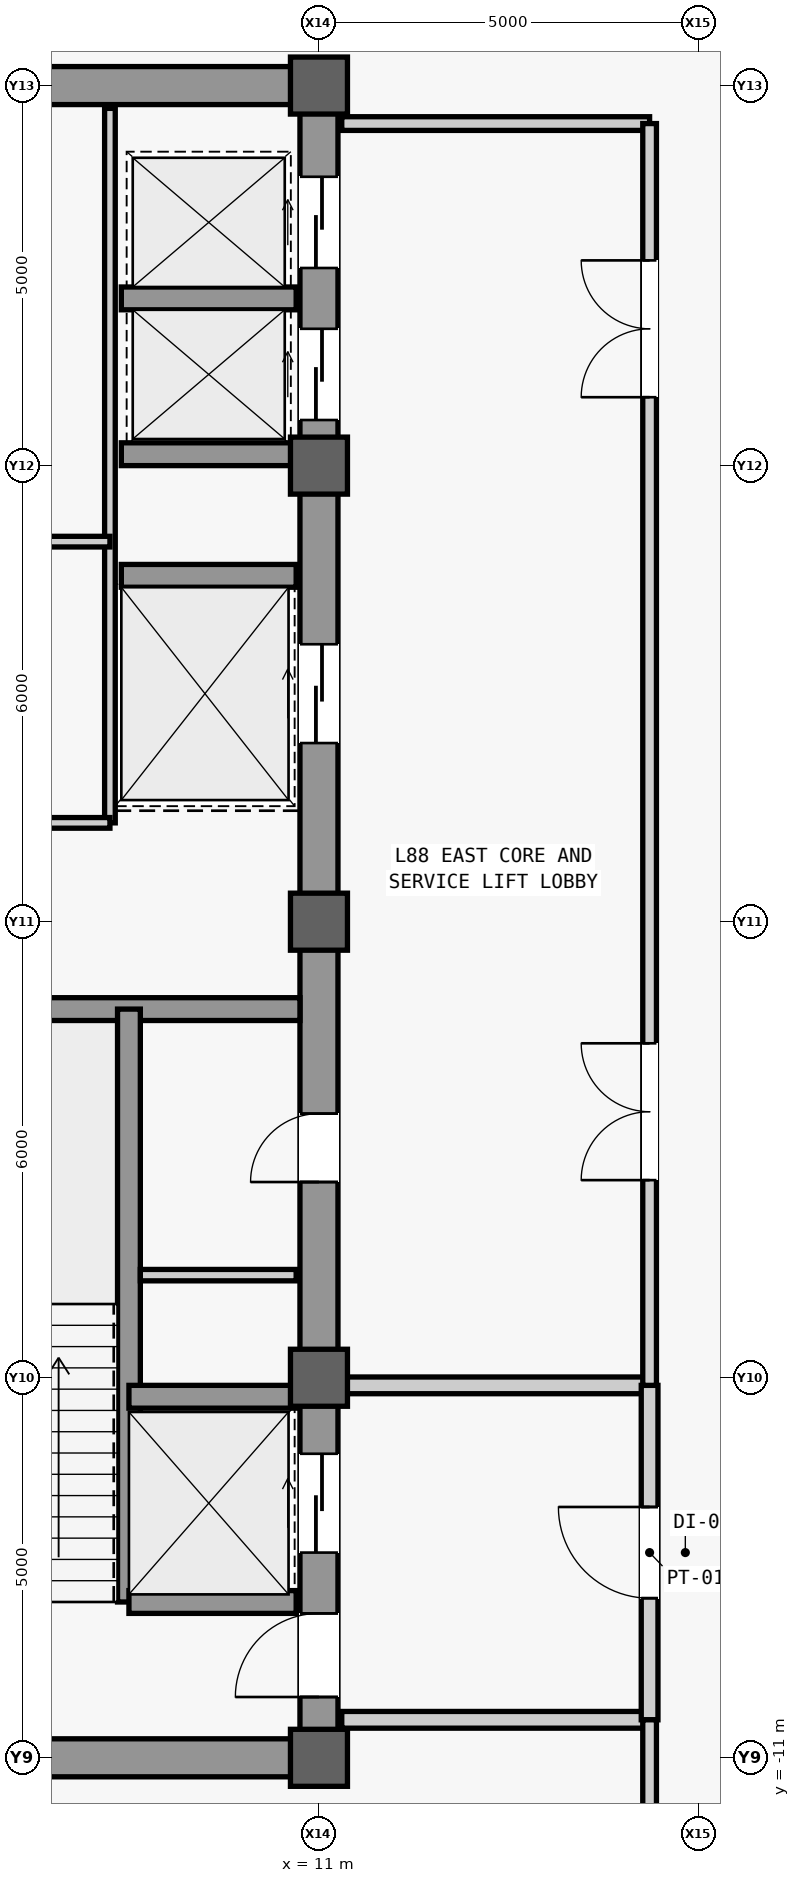
"""IFC4 building model, lengths in metres.
Left out: names, types, materials, properties, quantities, classifications, styles, units other than length and angle.
Written with IfcOpenShell. Run it as: python <this file> out.ifc"""

import sys

from ifc_helpers import new_model, si_unit, direction, frame, frame_2d, origin, origin_2d, place, context, subcontext, project, spatial, rectangle, extrude, source, transform, mapped, element, fill, save


model = new_model("IFC4")
c1 = context("Model", 3, precision=1e-05, world=origin(), true_north=direction((0.0, 1.0)))
c2 = subcontext(c1, "Body", "Model", "MODEL_VIEW")
j1 = project(units=[si_unit("LENGTHUNIT", "METRE"), si_unit("PLANEANGLEUNIT", "RADIAN")], contexts=[c1])
p1 = place(None, origin())
s1 = spatial("IfcSite", under=j1, at=p1, CompositionType="ELEMENT")
p2 = place(p1, origin())
s2 = spatial("IfcBuilding", under=s1, at=p2, CompositionType="ELEMENT")
p3 = place(p2, frame((0.0, 0.0, 370.3)))
s3 = spatial("IfcBuildingStorey", under=s2, at=p3, CompositionType="ELEMENT", Elevation=370.3)
m1 = source(origin(), c2, "Body", "SweptSolid", [
    extrude(rectangle(XDim=22.0, YDim=0.5, at=frame_2d((11.0, 0.0))), origin(), (0.0, 0.0, 1.0), 4.6),
])
p4 = place(p3, frame((11.0, -11.0, 0.0), z_axis=(0.0, 0.0, 1.0), x_axis=(0.0, 1.0, 0.0)))
e1 = element("IfcWall", 1, at=p4, inside=s3, PredefinedType="SHEAR", context=c2, shape_type="MappedRepresentation", body=[
    mapped(m1, transform((0.0, 0.0, 0.0), scale=1.0)),
])
m2 = source(origin(), c2, "Body", "SweptSolid", [
    extrude(rectangle(XDim=1.1, YDim=2.2, at=frame_2d((0.55, 1.1))), frame((0.0, 0.26, 0.0), z_axis=(0.0, -1.0, 0.0), x_axis=(1.0, 0.0, 0.0)), (0.0, 0.0, 1.0), 0.52),
])
p5 = place(p4, frame((0.8, 0.0, 0.0)))
e2 = element("IfcOpeningElement", 2, at=p5, cuts=e1, PredefinedType="OPENING", context=c2, shape_type="MappedRepresentation", body=[
    mapped(m2, transform((0.0, 0.0, 0.0), scale=1.0)),
])
m3 = source(origin(), c2, "Body", "SweptSolid", [
    extrude(rectangle(XDim=0.9, YDim=2.15, at=frame_2d((0.45, 1.075))), frame((0.0, 0.26, 0.0), z_axis=(0.0, -1.0, 0.0), x_axis=(1.0, 0.0, 0.0)), (0.0, 0.0, 1.0), 0.52),
])
p6 = place(p4, frame((7.575, 0.0, 0.0)))
e3 = element("IfcOpeningElement", 3, at=p6, cuts=e1, PredefinedType="OPENING", context=c2, shape_type="MappedRepresentation", body=[
    mapped(m3, transform((0.0, 0.0, 0.0), scale=1.0)),
])
m4 = source(origin(), c2, "Body", "SweptSolid", [
    extrude(rectangle(XDim=1.2, YDim=2.3, at=frame_2d((0.6, 1.15))), frame((0.0, 0.26, 0.0), z_axis=(0.0, -1.0, 0.0), x_axis=(1.0, 0.0, 0.0)), (0.0, 0.0, 1.0), 0.52),
])
p7 = place(p4, frame((17.6, 0.0, 0.0)))
e4 = element("IfcOpeningElement", 4, at=p7, cuts=e1, PredefinedType="OPENING", context=c2, shape_type="MappedRepresentation", body=[
    mapped(m4, transform((0.0, 0.0, 0.0), scale=1.0)),
])
p8 = place(p4, frame((19.6, 0.0, 0.0)))
e5 = element("IfcOpeningElement", 5, at=p8, cuts=e1, PredefinedType="OPENING", context=c2, shape_type="MappedRepresentation", body=[
    mapped(m4, transform((0.0, 0.0, 0.0), scale=1.0)),
])
m5 = source(origin(), c2, "Body", "SweptSolid", [
    extrude(rectangle(XDim=1.3, YDim=2.3, at=frame_2d((0.65, 1.15))), frame((0.0, 0.26, 0.0), z_axis=(0.0, -1.0, 0.0), x_axis=(1.0, 0.0, 0.0)), (0.0, 0.0, 1.0), 0.52),
])
p9 = place(p4, frame((2.7, 0.0, 0.0)))
e6 = element("IfcOpeningElement", 6, at=p9, cuts=e1, PredefinedType="OPENING", context=c2, shape_type="MappedRepresentation", body=[
    mapped(m5, transform((0.0, 0.0, 0.0), scale=1.0)),
])
p10 = place(p4, frame((13.35, 0.0, 0.0)))
e7 = element("IfcOpeningElement", 7, at=p10, cuts=e1, PredefinedType="OPENING", context=c2, shape_type="MappedRepresentation", body=[
    mapped(m5, transform((0.0, 0.0, 0.0), scale=1.0)),
])
m6 = source(origin(), c2, "Body", "SweptSolid", [
    extrude(rectangle(XDim=5.9, YDim=0.5, at=frame_2d((2.95, 0.0))), origin(), (0.0, 0.0, 1.0), 4.6),
])
p11 = place(p3, frame((4.85, -11.0, 0.0), z_axis=(0.0, 0.0, 1.0), x_axis=(1.0, 0.0, 0.0)))
e8 = element("IfcWall", 8, at=p11, inside=s3, PredefinedType="SHEAR", context=c2, shape_type="MappedRepresentation", body=[
    mapped(m6, transform((0.0, 0.0, 0.0), scale=1.0)),
])
p12 = place(p3, frame((4.85, 11.0, 0.0), z_axis=(0.0, 0.0, 1.0), x_axis=(1.0, 0.0, 0.0)))
e9 = element("IfcWall", 9, at=p12, inside=s3, PredefinedType="SHEAR", context=c2, shape_type="MappedRepresentation", body=[
    mapped(m6, transform((0.0, 0.0, 0.0), scale=1.0)),
])
p13 = place(p12, frame((0.5, 0.0, 0.0)))
e10 = element("IfcOpeningElement", 10, at=p13, cuts=e9, PredefinedType="OPENING", context=c2, shape_type="MappedRepresentation", body=[
    mapped(m3, transform((0.0, 0.0, 0.0), scale=1.0)),
])
m7 = source(origin(), c2, "Body", "SweptSolid", [
    extrude(rectangle(XDim=5.65, YDim=0.3, at=frame_2d((2.825, 0.0))), origin(), (0.0, 0.0, 1.0), 4.6),
])
p14 = place(p3, frame((5.1, -1.15, 0.0), z_axis=(0.0, 0.0, 1.0), x_axis=(1.0, 0.0, 0.0)))
e11 = element("IfcWall", 11, at=p14, inside=s3, PredefinedType="SHEAR", context=c2, shape_type="MappedRepresentation", body=[
    mapped(m7, transform((0.0, 0.0, 0.0), scale=1.0)),
])
m8 = source(origin(), c2, "Body", "SweptSolid", [
    extrude(rectangle(XDim=0.75, YDim=0.75, at=origin_2d()), origin(), (0.0, 0.0, 1.0), 5.2),
])
for number, where, z_axis, x_axis in (
    (12, (11.0, -11.0, 0.0), (0.0, 0.0, 1.0), (1.0, 0.0, 0.0)),
    (13, (11.0, -6.0, 0.0), (0.0, 0.0, 1.0), (1.0, 0.0, 0.0)),
    (14, (11.0, 0.0, 0.0), (0.0, 0.0, 1.0), (1.0, 0.0, 0.0)),
    (15, (11.0, 6.0, 0.0), (0.0, 0.0, 1.0), (1.0, 0.0, 0.0)),
    (16, (11.0, 11.0, 0.0), (0.0, 0.0, 1.0), (1.0, 0.0, 0.0)),
):
    element("IfcColumn", number, at=place(p3, frame(where, z_axis=z_axis, x_axis=x_axis)), inside=s3, PredefinedType="COLUMN", context=c2, shape_type="MappedRepresentation", body=[
        mapped(m8, transform((0.0, 0.0, 0.0), scale=1.0)),
    ])
m9 = source(origin(), c2, "Body", "SweptSolid", [
    extrude(rectangle(XDim=7.8, YDim=0.3, at=frame_2d((3.9, 0.0))), origin(), (0.0, 0.0, 1.0), 4.6),
])
p15 = place(p3, frame((8.5, -8.95, 0.0), z_axis=(0.0, 0.0, 1.0), x_axis=(0.0, 1.0, 0.0)))
e17 = element("IfcWall", 17, at=p15, inside=s3, PredefinedType="SHEAR", context=c2, shape_type="MappedRepresentation", body=[
    mapped(m9, transform((0.0, 0.0, 0.0), scale=1.0)),
])
m10 = source(origin(), c2, "Body", "SweptSolid", [
    extrude(rectangle(XDim=2.2, YDim=0.3, at=frame_2d((1.1, 0.0))), origin(), (0.0, 0.0, 1.0), 4.6),
])
for number, where, z_axis, x_axis in (
    (18, (8.5, -8.95, 0.0), (0.0, 0.0, 1.0), (1.0, 0.0, 0.0)),
    (19, (8.5, -6.25, 0.0), (0.0, 0.0, 1.0), (1.0, 0.0, 0.0)),
):
    element("IfcWall", number, at=place(p3, frame(where, z_axis=z_axis, x_axis=x_axis)), inside=s3, PredefinedType="SHEAR", context=c2, shape_type="MappedRepresentation", body=[
        mapped(m10, transform((0.0, 0.0, 0.0), scale=1.0)),
    ])
m11 = source(origin(), c2, "Body", "SweptSolid", [
    extrude(rectangle(XDim=2.3, YDim=0.3, at=frame_2d((1.15, 0.0))), origin(), (0.0, 0.0, 1.0), 4.6),
])
for number, where, z_axis, x_axis in (
    (20, (8.4, 4.55, 0.0), (0.0, 0.0, 1.0), (1.0, 0.0, 0.0)),
    (21, (8.4, 6.15, 0.0), (0.0, 0.0, 1.0), (1.0, 0.0, 0.0)),
    (22, (8.4, 8.2, 0.0), (0.0, 0.0, 1.0), (1.0, 0.0, 0.0)),
):
    element("IfcWall", number, at=place(p3, frame(where, z_axis=z_axis, x_axis=x_axis)), inside=s3, PredefinedType="SHEAR", context=c2, shape_type="MappedRepresentation", body=[
        mapped(m11, transform((0.0, 0.0, 0.0), scale=1.0)),
    ])
m12 = source(origin(), c2, "Body", "SweptSolid", [
    extrude(rectangle(XDim=2.05, YDim=0.15, at=frame_2d((1.025, 0.0))), origin(), (0.0, 0.0, 1.0), 4.6),
])
p16 = place(p3, frame((8.65, -4.65, 0.0), z_axis=(0.0, 0.0, 1.0), x_axis=(1.0, 0.0, 0.0)))
e23 = element("IfcWall", 23, at=p16, inside=s3, PredefinedType="PARTITIONING", context=c2, shape_type="MappedRepresentation", body=[
    mapped(m12, transform((0.0, 0.0, 0.0), scale=1.0)),
])
m13 = source(origin(), c2, "Body", "SweptSolid", [
    extrude(rectangle(XDim=9.4, YDim=0.14, at=frame_2d((4.7, 0.0))), origin(), (0.0, 0.0, 1.0), 4.6),
])
p17 = place(p3, frame((8.25, 1.3, 0.0), z_axis=(0.0, 0.0, 1.0), x_axis=(0.0, 1.0, 0.0)))
e24 = element("IfcWall", 24, at=p17, inside=s3, PredefinedType="PARTITIONING", context=c2, shape_type="MappedRepresentation", body=[
    mapped(m13, transform((0.0, 0.0, 0.0), scale=1.0)),
])
m14 = source(origin(), c2, "Body", "SweptSolid", [
    extrude(rectangle(XDim=3.15, YDim=0.14, at=frame_2d((1.575, 0.0))), origin(), (0.0, 0.0, 1.0), 4.6),
])
p18 = place(p3, frame((5.1, 1.3, 0.0), z_axis=(0.0, 0.0, 1.0), x_axis=(1.0, 0.0, 0.0)))
e25 = element("IfcWall", 25, at=p18, inside=s3, PredefinedType="PARTITIONING", context=c2, shape_type="MappedRepresentation", body=[
    mapped(m14, transform((0.0, 0.0, 0.0), scale=1.0)),
])
p19 = place(p3, frame((5.1, 5.0, 0.0), z_axis=(0.0, 0.0, 1.0), x_axis=(1.0, 0.0, 0.0)))
e26 = element("IfcWall", 26, at=p19, inside=s3, PredefinedType="PARTITIONING", context=c2, shape_type="MappedRepresentation", body=[
    mapped(m14, transform((0.0, 0.0, 0.0), scale=1.0)),
])
m15 = source(origin(), c2, "Body", "SweptSolid", [
    extrude(rectangle(XDim=0.9, YDim=2.15, at=frame_2d((0.45, 1.075))), frame((0.0, 0.08, 0.0), z_axis=(0.0, -1.0, 0.0), x_axis=(1.0, 0.0, 0.0)), (0.0, 0.0, 1.0), 0.16),
])
p20 = place(p19, frame((0.25, 0.0, 0.0)))
e27 = element("IfcOpeningElement", 27, at=p20, cuts=e26, PredefinedType="OPENING", context=c2, shape_type="MappedRepresentation", body=[
    mapped(m15, transform((0.0, 0.0, 0.0), scale=1.0)),
])
m16 = source(origin(), c2, "Body", "SweptSolid", [
    extrude(rectangle(XDim=4.05, YDim=0.22, at=frame_2d((2.025, 0.0))), origin(), (0.0, 0.0, 1.0), 4.6),
])
p21 = place(p3, frame((11.3, -10.5, 0.0), z_axis=(0.0, 0.0, 1.0), x_axis=(1.0, 0.0, 0.0)))
e28 = element("IfcWall", 28, at=p21, inside=s3, PredefinedType="PARTITIONING", context=c2, shape_type="MappedRepresentation", body=[
    mapped(m16, transform((0.0, 0.0, 0.0), scale=1.0)),
])
m17 = source(origin(), c2, "Body", "SweptSolid", [
    extrude(rectangle(XDim=4.05, YDim=0.22, at=frame_2d((2.025, 0.0))), origin(), (0.0, 0.0, 1.0), 2.8),
])
p22 = place(p3, frame((11.3, -6.1, 0.0), z_axis=(0.0, 0.0, 1.0), x_axis=(1.0, 0.0, 0.0)))
e29 = element("IfcWall", 29, at=p22, inside=s3, PredefinedType="PARTITIONING", context=c2, shape_type="MappedRepresentation", body=[
    mapped(m17, transform((0.0, 0.0, 0.0), scale=1.0)),
])
m18 = source(origin(), c2, "Body", "SweptSolid", [
    extrude(rectangle(XDim=4.4, YDim=0.22, at=frame_2d((2.2, 0.0))), origin(), (0.0, 0.0, 1.0), 4.6),
])
p23 = place(p3, frame((15.35, -10.5, 0.0), z_axis=(0.0, 0.0, 1.0), x_axis=(0.0, 1.0, 0.0)))
e30 = element("IfcWall", 30, at=p23, inside=s3, PredefinedType="PARTITIONING", context=c2, shape_type="MappedRepresentation", body=[
    mapped(m18, transform((0.0, 0.0, 0.0), scale=1.0)),
])
m19 = source(origin(), c2, "Body", "SweptSolid", [
    extrude(rectangle(XDim=1.2, YDim=2.2, at=frame_2d((0.6, 1.1))), frame((0.0, 0.12, 0.0), z_axis=(0.0, -1.0, 0.0), x_axis=(1.0, 0.0, 0.0)), (0.0, 0.0, 1.0), 0.24),
])
p24 = place(p23, frame((1.6, 0.0, 0.0)))
e31 = element("IfcOpeningElement", 31, at=p24, cuts=e30, PredefinedType="OPENING", context=c2, shape_type="MappedRepresentation", body=[
    mapped(m19, transform((0.0, 0.0, 0.0), scale=1.0)),
])
m20 = source(origin(), c2, "Body", "SweptSolid", [
    extrude(rectangle(XDim=4.05, YDim=0.18, at=frame_2d((2.025, 0.0))), origin(), (0.0, 0.0, 1.0), 4.6),
])
p25 = place(p3, frame((11.3, 10.5, 0.0), z_axis=(0.0, 0.0, 1.0), x_axis=(1.0, 0.0, 0.0)))
e32 = element("IfcWall", 32, at=p25, inside=s3, PredefinedType="PARTITIONING", context=c2, shape_type="MappedRepresentation", body=[
    mapped(m20, transform((0.0, 0.0, 0.0), scale=1.0)),
])
m21 = source(origin(), c2, "Body", "SweptSolid", [
    extrude(rectangle(XDim=16.6, YDim=0.18, at=frame_2d((8.3, 0.0))), origin(), (0.0, 0.0, 1.0), 4.6),
])
p26 = place(p3, frame((15.35, -6.1, 0.0), z_axis=(0.0, 0.0, 1.0), x_axis=(0.0, 1.0, 0.0)))
e33 = element("IfcWall", 33, at=p26, inside=s3, PredefinedType="PARTITIONING", context=c2, shape_type="MappedRepresentation", body=[
    mapped(m21, transform((0.0, 0.0, 0.0), scale=1.0)),
])
m22 = source(origin(), c2, "Body", "SweptSolid", [
    extrude(rectangle(XDim=1.8, YDim=2.25, at=frame_2d((0.9, 1.125))), frame((0.0, 0.1, 0.0), z_axis=(0.0, -1.0, 0.0), x_axis=(1.0, 0.0, 0.0)), (0.0, 0.0, 1.0), 0.2),
])
p27 = place(p26, frame((2.7, 0.0, 0.0)))
e34 = element("IfcOpeningElement", 34, at=p27, cuts=e33, PredefinedType="OPENING", context=c2, shape_type="MappedRepresentation", body=[
    mapped(m22, transform((0.0, 0.0, 0.0), scale=1.0)),
])
p28 = place(p26, frame((13.0, 0.0, 0.0)))
e35 = element("IfcOpeningElement", 35, at=p28, cuts=e33, PredefinedType="OPENING", context=c2, shape_type="MappedRepresentation", body=[
    mapped(m22, transform((0.0, 0.0, 0.0), scale=1.0)),
])
m23 = source(origin(), c2, "Body", "SweptSolid", [
    extrude(rectangle(XDim=6.5, YDim=0.18, at=frame_2d((3.25, 0.0))), origin(), (0.0, 0.0, 1.0), 4.6),
])
p29 = place(p3, frame((15.35, -17.0, 0.0), z_axis=(0.0, 0.0, 1.0), x_axis=(0.0, 1.0, 0.0)))
e36 = element("IfcWall", 36, at=p29, inside=s3, PredefinedType="PARTITIONING", context=c2, shape_type="MappedRepresentation", body=[
    mapped(m23, transform((0.0, 0.0, 0.0), scale=1.0)),
])
m24 = source(origin(), c2, "Body", "SweptSolid", [
    extrude(rectangle(XDim=1.1, YDim=2.2, at=frame_2d((0.55, 1.1))), frame((0.0, 0.025, 0.0), z_axis=(0.0, -1.0, 0.0), x_axis=(1.0, 0.0, 0.0)), (0.0, 0.0, 1.0), 0.05),
])
p30 = place(p5, origin())
e37 = element("IfcDoor", 37, at=p30, inside=s3, OperationType="SINGLE_SWING_LEFT", PredefinedType="DOOR", context=c2, shape_type="MappedRepresentation", body=[
    mapped(m24, transform((0.0, 0.0, 0.0), scale=1.0)),
])
fill(e2, e37)
m25 = source(origin(), c2, "Body", "SweptSolid", [
    extrude(rectangle(XDim=0.9, YDim=2.15, at=frame_2d((0.45, 1.075))), frame((0.0, 0.025, 0.0), z_axis=(0.0, -1.0, 0.0), x_axis=(1.0, 0.0, 0.0)), (0.0, 0.0, 1.0), 0.05),
])
p31 = place(p6, origin())
e38 = element("IfcDoor", 38, at=p31, inside=s3, OperationType="SINGLE_SWING_LEFT", PredefinedType="DOOR", context=c2, shape_type="MappedRepresentation", body=[
    mapped(m25, transform((0.0, 0.0, 0.0), scale=1.0)),
])
fill(e3, e38)
m26 = source(origin(), c2, "Body", "SweptSolid", [
    extrude(rectangle(XDim=1.2, YDim=2.2, at=frame_2d((0.6, 1.1))), frame((0.0, 0.025, 0.0), z_axis=(0.0, -1.0, 0.0), x_axis=(1.0, 0.0, 0.0)), (0.0, 0.0, 1.0), 0.05),
])
p32 = place(p24, origin())
e39 = element("IfcDoor", 39, at=p32, inside=s3, OperationType="SINGLE_SWING_RIGHT", PredefinedType="DOOR", context=c2, shape_type="MappedRepresentation", body=[
    mapped(m26, transform((0.0, 0.0, 0.0), scale=1.0)),
])
fill(e31, e39)
m27 = source(origin(), c2, "Body", "SweptSolid", [
    extrude(rectangle(XDim=1.8, YDim=2.25, at=frame_2d((0.9, 1.125))), frame((0.0, 0.025, 0.0), z_axis=(0.0, -1.0, 0.0), x_axis=(1.0, 0.0, 0.0)), (0.0, 0.0, 1.0), 0.05),
])
p33 = place(p27, origin())
e40 = element("IfcDoor", 40, at=p33, inside=s3, OperationType="SINGLE_SWING_RIGHT", PredefinedType="DOOR", context=c2, shape_type="MappedRepresentation", body=[
    mapped(m27, transform((0.0, 0.0, 0.0), scale=1.0)),
])
fill(e34, e40)
p34 = place(p28, origin())
e41 = element("IfcDoor", 41, at=p34, inside=s3, OperationType="SINGLE_SWING_LEFT", PredefinedType="DOOR", context=c2, shape_type="MappedRepresentation", body=[
    mapped(m27, transform((0.0, 0.0, 0.0), scale=1.0)),
])
fill(e35, e41)
m28 = source(origin(), c2, "Body", "SweptSolid", [
    extrude(rectangle(XDim=1.2, YDim=2.3, at=frame_2d((0.6, 1.15))), frame((0.0, 0.025, 0.0), z_axis=(0.0, -1.0, 0.0), x_axis=(1.0, 0.0, 0.0)), (0.0, 0.0, 1.0), 0.05),
])
p35 = place(p7, origin())
e42 = element("IfcDoor", 42, at=p35, inside=s3, OperationType="SLIDING_TO_LEFT", PredefinedType="DOOR", context=c2, shape_type="MappedRepresentation", body=[
    mapped(m28, transform((0.0, 0.0, 0.0), scale=1.0)),
])
fill(e4, e42)
p36 = place(p8, origin())
e43 = element("IfcDoor", 43, at=p36, inside=s3, OperationType="SLIDING_TO_LEFT", PredefinedType="DOOR", context=c2, shape_type="MappedRepresentation", body=[
    mapped(m28, transform((0.0, 0.0, 0.0), scale=1.0)),
])
fill(e5, e43)
m29 = source(origin(), c2, "Body", "SweptSolid", [
    extrude(rectangle(XDim=1.3, YDim=2.3, at=frame_2d((0.65, 1.15))), frame((0.0, 0.025, 0.0), z_axis=(0.0, -1.0, 0.0), x_axis=(1.0, 0.0, 0.0)), (0.0, 0.0, 1.0), 0.05),
])
p37 = place(p9, origin())
e44 = element("IfcDoor", 44, at=p37, inside=s3, OperationType="SLIDING_TO_LEFT", PredefinedType="DOOR", context=c2, shape_type="MappedRepresentation", body=[
    mapped(m29, transform((0.0, 0.0, 0.0), scale=1.0)),
])
fill(e6, e44)
p38 = place(p10, origin())
e45 = element("IfcDoor", 45, at=p38, inside=s3, OperationType="SLIDING_TO_LEFT", PredefinedType="DOOR", context=c2, shape_type="MappedRepresentation", body=[
    mapped(m29, transform((0.0, 0.0, 0.0), scale=1.0)),
])
fill(e7, e45)
save(model, sys.argv[1])
